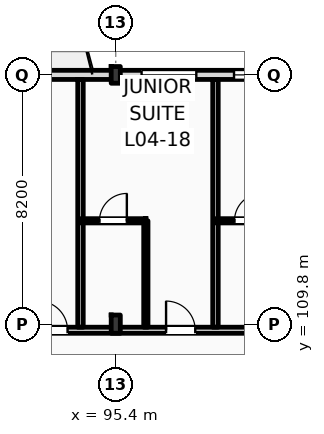
"""IFC4 building model, lengths in metres.
Left out: names, types, materials, properties, quantities, classifications, styles, units other than length and angle.
Written with IfcOpenShell. Run it as: python <this file> out.ifc"""

import sys

from ifc_helpers import new_model, si_unit, direction, frame, frame_2d, origin, origin_2d, place, context, subcontext, project, spatial, rectangle, i_section, extrude, element, fill, save


model = new_model("IFC4")
c1 = context("Model", 3, precision=1e-05, world=origin(), true_north=direction((0.0, 1.0)))
c2 = subcontext(c1, "Body", "Model", "MODEL_VIEW")
j1 = project(units=[si_unit("LENGTHUNIT", "METRE"), si_unit("PLANEANGLEUNIT", "RADIAN")], contexts=[c1])
p1 = place(None, origin())
s1 = spatial("IfcSite", under=j1, at=p1, CompositionType="ELEMENT")
p2 = place(p1, origin())
s2 = spatial("IfcBuilding", under=s1, at=p2, CompositionType="ELEMENT")
p3 = place(p2, frame((0.0, 0.0, 20.4)))
s3 = spatial("IfcBuildingStorey", under=s2, at=p3, CompositionType="ELEMENT", Elevation=20.4)
p4 = place(p3, frame((95.4, 109.8, 0.0), z_axis=(0.0, 0.0, 1.0), x_axis=(1.0, 0.0, 0.0)))
e1 = element("IfcColumn", 1, at=p4, inside=s3, PredefinedType="COLUMN", context=c2, shape_type="SweptSolid", body=[
    extrude(i_section(OverallWidth=0.3, OverallDepth=0.6, WebThickness=0.015, FlangeThickness=0.03, FilletRadius=0.027, at=origin_2d()), origin(), (0.0, 0.0, 1.0), 4.2),
])
p5 = place(p3, frame((95.4, 118.0, 0.0), z_axis=(0.0, 0.0, 1.0), x_axis=(1.0, 0.0, 0.0)))
e2 = element("IfcColumn", 2, at=p5, inside=s3, PredefinedType="COLUMN", context=c2, shape_type="SweptSolid", body=[
    extrude(i_section(OverallWidth=0.3, OverallDepth=0.55, WebThickness=0.015, FlangeThickness=0.029, FilletRadius=0.027, at=origin_2d()), origin(), (0.0, 0.0, 1.0), 4.2),
])
p6 = place(p3, frame((22.5, 118.0, 0.0), z_axis=(0.0, 0.0, 1.0), x_axis=(1.0, 0.0, 0.0)))
e3 = element("IfcWall", 3, at=p6, inside=s3, PredefinedType="STANDARD", context=c2, shape_type="SweptSolid", body=[
    extrude(rectangle(XDim=97.5, YDim=0.3, at=frame_2d((48.75, 0.0))), origin(), (0.0, 0.0, 1.0), 3.38),
])
p7 = place(p6, frame((0.91, 0.0, 0.9)))
e4 = element("IfcOpeningElement", 4, at=p7, cuts=e3, PredefinedType="OPENING", context=c2, shape_type="SweptSolid", body=[
    extrude(rectangle(XDim=0.9, YDim=1.8, at=frame_2d((0.45, 0.9))), frame((0.0, 0.16, 0.0), z_axis=(0.0, -1.0, 0.0), x_axis=(1.0, 0.0, 0.0)), (0.0, 0.0, 1.0), 0.32),
])
p8 = place(p6, frame((6.36, 0.0, 0.0)))
e5 = element("IfcOpeningElement", 5, at=p8, cuts=e3, PredefinedType="OPENING", context=c2, shape_type="SweptSolid", body=[
    extrude(rectangle(XDim=1.2, YDim=2.25, at=frame_2d((0.6, 1.125))), frame((0.0, 0.16, 0.0), z_axis=(0.0, -1.0, 0.0), x_axis=(1.0, 0.0, 0.0)), (0.0, 0.0, 1.0), 0.32),
])
p9 = place(p6, frame((11.41, 0.0, 0.9)))
e6 = element("IfcOpeningElement", 6, at=p9, cuts=e3, PredefinedType="OPENING", context=c2, shape_type="SweptSolid", body=[
    extrude(rectangle(XDim=1.1, YDim=1.9, at=frame_2d((0.55, 0.95))), frame((0.0, 0.16, 0.0), z_axis=(0.0, -1.0, 0.0), x_axis=(1.0, 0.0, 0.0)), (0.0, 0.0, 1.0), 0.32),
])
p10 = place(p6, frame((14.335, 0.0, 0.9)))
e7 = element("IfcOpeningElement", 7, at=p10, cuts=e3, PredefinedType="OPENING", context=c2, shape_type="SweptSolid", body=[
    extrude(rectangle(XDim=1.65, YDim=1.95, at=frame_2d((0.825, 0.975))), frame((0.0, 0.16, 0.0), z_axis=(0.0, -1.0, 0.0), x_axis=(1.0, 0.0, 0.0)), (0.0, 0.0, 1.0), 0.32),
])
p11 = place(p6, frame((19.26, 0.0, 0.9)))
e8 = element("IfcOpeningElement", 8, at=p11, cuts=e3, PredefinedType="OPENING", context=c2, shape_type="SweptSolid", body=[
    extrude(rectangle(XDim=1.35, YDim=2.0, at=frame_2d((0.675, 1.0))), frame((0.0, 0.16, 0.0), z_axis=(0.0, -1.0, 0.0), x_axis=(1.0, 0.0, 0.0)), (0.0, 0.0, 1.0), 0.32),
])
p12 = place(p6, frame((22.8, 0.0, 0.0)))
e9 = element("IfcOpeningElement", 9, at=p12, cuts=e3, PredefinedType="OPENING", context=c2, shape_type="SweptSolid", body=[
    extrude(rectangle(XDim=1.2, YDim=2.25, at=frame_2d((0.6, 1.125))), frame((0.0, 0.16, 0.0), z_axis=(0.0, -1.0, 0.0), x_axis=(1.0, 0.0, 0.0)), (0.0, 0.0, 1.0), 0.32),
])
p13 = place(p6, frame((26.91, 0.0, 0.9)))
e10 = element("IfcOpeningElement", 10, at=p13, cuts=e3, PredefinedType="OPENING", context=c2, shape_type="SweptSolid", body=[
    extrude(rectangle(XDim=2.1, YDim=2.1, at=frame_2d((1.05, 1.05))), frame((0.0, 0.16, 0.0), z_axis=(0.0, -1.0, 0.0), x_axis=(1.0, 0.0, 0.0)), (0.0, 0.0, 1.0), 0.32),
])
p14 = place(p6, frame((30.835, 0.0, 0.9)))
e11 = element("IfcOpeningElement", 11, at=p14, cuts=e3, PredefinedType="OPENING", context=c2, shape_type="SweptSolid", body=[
    extrude(rectangle(XDim=2.25, YDim=2.15, at=frame_2d((1.125, 1.075))), frame((0.0, 0.16, 0.0), z_axis=(0.0, -1.0, 0.0), x_axis=(1.0, 0.0, 0.0)), (0.0, 0.0, 1.0), 0.32),
])
p15 = place(p6, frame((34.96, 0.0, 0.9)))
e12 = element("IfcOpeningElement", 12, at=p15, cuts=e3, PredefinedType="OPENING", context=c2, shape_type="SweptSolid", body=[
    extrude(rectangle(XDim=2.4, YDim=2.2, at=frame_2d((1.2, 1.1))), frame((0.0, 0.16, 0.0), z_axis=(0.0, -1.0, 0.0), x_axis=(1.0, 0.0, 0.0)), (0.0, 0.0, 1.0), 0.32),
])
p16 = place(p6, frame((39.0, 0.0, 0.0)))
e13 = element("IfcOpeningElement", 13, at=p16, cuts=e3, PredefinedType="OPENING", context=c2, shape_type="SweptSolid", body=[
    extrude(rectangle(XDim=1.2, YDim=2.25, at=frame_2d((0.6, 1.125))), frame((0.0, 0.16, 0.0), z_axis=(0.0, -1.0, 0.0), x_axis=(1.0, 0.0, 0.0)), (0.0, 0.0, 1.0), 0.32),
])
p17 = place(p6, frame((43.21, 0.0, 0.9)))
e14 = element("IfcOpeningElement", 14, at=p17, cuts=e3, PredefinedType="OPENING", context=c2, shape_type="SweptSolid", body=[
    extrude(rectangle(XDim=2.7, YDim=2.3, at=frame_2d((1.35, 1.15))), frame((0.0, 0.16, 0.0), z_axis=(0.0, -1.0, 0.0), x_axis=(1.0, 0.0, 0.0)), (0.0, 0.0, 1.0), 0.32),
])
p18 = place(p6, frame((47.335, 0.0, 0.9)))
e15 = element("IfcOpeningElement", 15, at=p18, cuts=e3, PredefinedType="OPENING", context=c2, shape_type="SweptSolid", body=[
    extrude(rectangle(XDim=1.35, YDim=2.3, at=frame_2d((0.675, 1.15))), frame((0.0, 0.16, 0.0), z_axis=(0.0, -1.0, 0.0), x_axis=(1.0, 0.0, 0.0)), (0.0, 0.0, 1.0), 0.32),
])
p19 = place(p6, frame((52.74, 0.0, 0.0)))
e16 = element("IfcOpeningElement", 16, at=p19, cuts=e3, PredefinedType="OPENING", context=c2, shape_type="SweptSolid", body=[
    extrude(rectangle(XDim=1.2, YDim=2.25, at=frame_2d((0.6, 1.125))), frame((0.0, 0.16, 0.0), z_axis=(0.0, -1.0, 0.0), x_axis=(1.0, 0.0, 0.0)), (0.0, 0.0, 1.0), 0.32),
])
p20 = place(p6, frame((55.36, 0.0, 0.9)))
e17 = element("IfcOpeningElement", 17, at=p20, cuts=e3, PredefinedType="OPENING", context=c2, shape_type="SweptSolid", body=[
    extrude(rectangle(XDim=1.1, YDim=2.3, at=frame_2d((0.55, 1.15))), frame((0.0, 0.16, 0.0), z_axis=(0.0, -1.0, 0.0), x_axis=(1.0, 0.0, 0.0)), (0.0, 0.0, 1.0), 0.32),
])
p21 = place(p6, frame((59.99, 0.0, 0.9)))
e18 = element("IfcOpeningElement", 18, at=p21, cuts=e3, PredefinedType="OPENING", context=c2, shape_type="SweptSolid", body=[
    extrude(rectangle(XDim=2.74, YDim=2.3, at=frame_2d((1.37, 1.15))), frame((0.0, 0.16, 0.0), z_axis=(0.0, -1.0, 0.0), x_axis=(1.0, 0.0, 0.0)), (0.0, 0.0, 1.0), 0.32),
])
p22 = place(p6, frame((65.95, 0.0, 0.9)))
e19 = element("IfcOpeningElement", 19, at=p22, cuts=e3, PredefinedType="OPENING", context=c2, shape_type="SweptSolid", body=[
    extrude(rectangle(XDim=1.35, YDim=2.3, at=frame_2d((0.675, 1.15))), frame((0.0, 0.16, 0.0), z_axis=(0.0, -1.0, 0.0), x_axis=(1.0, 0.0, 0.0)), (0.0, 0.0, 1.0), 0.32),
])
p23 = place(p6, frame((69.16, 0.0, 0.0)))
e20 = element("IfcOpeningElement", 20, at=p23, cuts=e3, PredefinedType="OPENING", context=c2, shape_type="SweptSolid", body=[
    extrude(rectangle(XDim=1.2, YDim=2.25, at=frame_2d((0.6, 1.125))), frame((0.0, 0.16, 0.0), z_axis=(0.0, -1.0, 0.0), x_axis=(1.0, 0.0, 0.0)), (0.0, 0.0, 1.0), 0.32),
])
p24 = place(p6, frame((73.75, 0.0, 0.9)))
e21 = element("IfcOpeningElement", 21, at=p24, cuts=e3, PredefinedType="OPENING", context=c2, shape_type="SweptSolid", body=[
    extrude(rectangle(XDim=1.8, YDim=2.3, at=frame_2d((0.9, 1.15))), frame((0.0, 0.16, 0.0), z_axis=(0.0, -1.0, 0.0), x_axis=(1.0, 0.0, 0.0)), (0.0, 0.0, 1.0), 0.32),
])
p25 = place(p6, frame((76.79, 0.0, 0.9)))
e22 = element("IfcOpeningElement", 22, at=p25, cuts=e3, PredefinedType="OPENING", context=c2, shape_type="SweptSolid", body=[
    extrude(rectangle(XDim=2.74, YDim=2.3, at=frame_2d((1.37, 1.15))), frame((0.0, 0.16, 0.0), z_axis=(0.0, -1.0, 0.0), x_axis=(1.0, 0.0, 0.0)), (0.0, 0.0, 1.0), 0.32),
])
p26 = place(p6, frame((81.55, 0.0, 0.9)))
e23 = element("IfcOpeningElement", 23, at=p26, cuts=e3, PredefinedType="OPENING", context=c2, shape_type="SweptSolid", body=[
    extrude(rectangle(XDim=1.8, YDim=2.3, at=frame_2d((0.9, 1.15))), frame((0.0, 0.16, 0.0), z_axis=(0.0, -1.0, 0.0), x_axis=(1.0, 0.0, 0.0)), (0.0, 0.0, 1.0), 0.32),
])
p27 = place(p6, frame((86.01, 0.0, 0.9)))
e24 = element("IfcOpeningElement", 24, at=p27, cuts=e3, PredefinedType="OPENING", context=c2, shape_type="SweptSolid", body=[
    extrude(rectangle(XDim=1.1, YDim=1.5, at=frame_2d((0.55, 0.75))), frame((0.0, 0.16, 0.0), z_axis=(0.0, -1.0, 0.0), x_axis=(1.0, 0.0, 0.0)), (0.0, 0.0, 1.0), 0.32),
])
p28 = place(p6, frame((90.135, 0.0, 0.9)))
e25 = element("IfcOpeningElement", 25, at=p28, cuts=e3, PredefinedType="OPENING", context=c2, shape_type="SweptSolid", body=[
    extrude(rectangle(XDim=1.25, YDim=1.6, at=frame_2d((0.625, 0.8))), frame((0.0, 0.16, 0.0), z_axis=(0.0, -1.0, 0.0), x_axis=(1.0, 0.0, 0.0)), (0.0, 0.0, 1.0), 0.32),
])
p29 = place(p6, frame((94.34, 0.0, 0.9)))
e26 = element("IfcOpeningElement", 26, at=p29, cuts=e3, PredefinedType="OPENING", context=c2, shape_type="SweptSolid", body=[
    extrude(rectangle(XDim=1.4, YDim=1.7, at=frame_2d((0.7, 0.85))), frame((0.0, 0.16, 0.0), z_axis=(0.0, -1.0, 0.0), x_axis=(1.0, 0.0, 0.0)), (0.0, 0.0, 1.0), 0.32),
])
p30 = place(p3, frame((10.65, 109.6, 0.0), z_axis=(0.0, 0.0, 1.0), x_axis=(1.0, 0.0, 0.0)))
e27 = element("IfcWall", 27, at=p30, inside=s3, PredefinedType="PARTITIONING", context=c2, shape_type="SweptSolid", body=[
    extrude(rectangle(XDim=109.21, YDim=0.2, at=frame_2d((54.605, 0.0))), origin(), (0.0, 0.0, 1.0), 3.38),
])
p31 = place(p30, frame((12.535, 0.0, 0.0)))
e28 = element("IfcOpeningElement", 28, at=p31, cuts=e27, PredefinedType="OPENING", context=c2, shape_type="SweptSolid", body=[
    extrude(rectangle(XDim=1.02, YDim=2.2, at=frame_2d((0.51, 1.1))), frame((0.0, 0.11, 0.0), z_axis=(0.0, -1.0, 0.0), x_axis=(1.0, 0.0, 0.0)), (0.0, 0.0, 1.0), 0.22),
])
p32 = place(p30, frame((19.175, 0.0, 0.0)))
e29 = element("IfcOpeningElement", 29, at=p32, cuts=e27, PredefinedType="OPENING", context=c2, shape_type="SweptSolid", body=[
    extrude(rectangle(XDim=1.02, YDim=2.2, at=frame_2d((0.51, 1.1))), frame((0.0, 0.11, 0.0), z_axis=(0.0, -1.0, 0.0), x_axis=(1.0, 0.0, 0.0)), (0.0, 0.0, 1.0), 0.22),
])
p33 = place(p30, frame((23.375, 0.0, 0.0)))
e30 = element("IfcOpeningElement", 30, at=p33, cuts=e27, PredefinedType="OPENING", context=c2, shape_type="SweptSolid", body=[
    extrude(rectangle(XDim=1.02, YDim=2.2, at=frame_2d((0.51, 1.1))), frame((0.0, 0.11, 0.0), z_axis=(0.0, -1.0, 0.0), x_axis=(1.0, 0.0, 0.0)), (0.0, 0.0, 1.0), 0.22),
])
p34 = place(p30, frame((27.575, 0.0, 0.0)))
e31 = element("IfcOpeningElement", 31, at=p34, cuts=e27, PredefinedType="OPENING", context=c2, shape_type="SweptSolid", body=[
    extrude(rectangle(XDim=1.02, YDim=2.2, at=frame_2d((0.51, 1.1))), frame((0.0, 0.11, 0.0), z_axis=(0.0, -1.0, 0.0), x_axis=(1.0, 0.0, 0.0)), (0.0, 0.0, 1.0), 0.22),
])
p35 = place(p30, frame((31.805, 0.0, 0.0)))
e32 = element("IfcOpeningElement", 32, at=p35, cuts=e27, PredefinedType="OPENING", context=c2, shape_type="SweptSolid", body=[
    extrude(rectangle(XDim=0.96, YDim=2.2, at=frame_2d((0.48, 1.1))), frame((0.0, 0.11, 0.0), z_axis=(0.0, -1.0, 0.0), x_axis=(1.0, 0.0, 0.0)), (0.0, 0.0, 1.0), 0.22),
])
p36 = place(p30, frame((33.855, 0.0, 0.0)))
e33 = element("IfcOpeningElement", 33, at=p36, cuts=e27, PredefinedType="OPENING", context=c2, shape_type="SweptSolid", body=[
    extrude(rectangle(XDim=0.96, YDim=2.2, at=frame_2d((0.48, 1.1))), frame((0.0, 0.11, 0.0), z_axis=(0.0, -1.0, 0.0), x_axis=(1.0, 0.0, 0.0)), (0.0, 0.0, 1.0), 0.22),
])
p37 = place(p30, frame((40.205, 0.0, 0.0)))
e34 = element("IfcOpeningElement", 34, at=p37, cuts=e27, PredefinedType="OPENING", context=c2, shape_type="SweptSolid", body=[
    extrude(rectangle(XDim=0.96, YDim=2.2, at=frame_2d((0.48, 1.1))), frame((0.0, 0.11, 0.0), z_axis=(0.0, -1.0, 0.0), x_axis=(1.0, 0.0, 0.0)), (0.0, 0.0, 1.0), 0.22),
])
p38 = place(p30, frame((42.255, 0.0, 0.0)))
e35 = element("IfcOpeningElement", 35, at=p38, cuts=e27, PredefinedType="OPENING", context=c2, shape_type="SweptSolid", body=[
    extrude(rectangle(XDim=0.96, YDim=2.2, at=frame_2d((0.48, 1.1))), frame((0.0, 0.11, 0.0), z_axis=(0.0, -1.0, 0.0), x_axis=(1.0, 0.0, 0.0)), (0.0, 0.0, 1.0), 0.22),
])
p39 = place(p30, frame((48.605, 0.0, 0.0)))
e36 = element("IfcOpeningElement", 36, at=p39, cuts=e27, PredefinedType="OPENING", context=c2, shape_type="SweptSolid", body=[
    extrude(rectangle(XDim=0.96, YDim=2.2, at=frame_2d((0.48, 1.1))), frame((0.0, 0.11, 0.0), z_axis=(0.0, -1.0, 0.0), x_axis=(1.0, 0.0, 0.0)), (0.0, 0.0, 1.0), 0.22),
])
p40 = place(p30, frame((50.655, 0.0, 0.0)))
e37 = element("IfcOpeningElement", 37, at=p40, cuts=e27, PredefinedType="OPENING", context=c2, shape_type="SweptSolid", body=[
    extrude(rectangle(XDim=0.96, YDim=2.2, at=frame_2d((0.48, 1.1))), frame((0.0, 0.11, 0.0), z_axis=(0.0, -1.0, 0.0), x_axis=(1.0, 0.0, 0.0)), (0.0, 0.0, 1.0), 0.22),
])
p41 = place(p30, frame((57.005, 0.0, 0.0)))
e38 = element("IfcOpeningElement", 38, at=p41, cuts=e27, PredefinedType="OPENING", context=c2, shape_type="SweptSolid", body=[
    extrude(rectangle(XDim=0.96, YDim=2.2, at=frame_2d((0.48, 1.1))), frame((0.0, 0.11, 0.0), z_axis=(0.0, -1.0, 0.0), x_axis=(1.0, 0.0, 0.0)), (0.0, 0.0, 1.0), 0.22),
])
p42 = place(p30, frame((59.055, 0.0, 0.0)))
e39 = element("IfcOpeningElement", 39, at=p42, cuts=e27, PredefinedType="OPENING", context=c2, shape_type="SweptSolid", body=[
    extrude(rectangle(XDim=0.96, YDim=2.2, at=frame_2d((0.48, 1.1))), frame((0.0, 0.11, 0.0), z_axis=(0.0, -1.0, 0.0), x_axis=(1.0, 0.0, 0.0)), (0.0, 0.0, 1.0), 0.22),
])
p43 = place(p30, frame((65.405, 0.0, 0.0)))
e40 = element("IfcOpeningElement", 40, at=p43, cuts=e27, PredefinedType="OPENING", context=c2, shape_type="SweptSolid", body=[
    extrude(rectangle(XDim=0.96, YDim=2.2, at=frame_2d((0.48, 1.1))), frame((0.0, 0.11, 0.0), z_axis=(0.0, -1.0, 0.0), x_axis=(1.0, 0.0, 0.0)), (0.0, 0.0, 1.0), 0.22),
])
p44 = place(p30, frame((67.205, 0.0, 0.0)))
e41 = element("IfcOpeningElement", 41, at=p44, cuts=e27, PredefinedType="OPENING", context=c2, shape_type="SweptSolid", body=[
    extrude(rectangle(XDim=0.96, YDim=2.2, at=frame_2d((0.48, 1.1))), frame((0.0, 0.11, 0.0), z_axis=(0.0, -1.0, 0.0), x_axis=(1.0, 0.0, 0.0)), (0.0, 0.0, 1.0), 0.22),
])
p45 = place(p30, frame((73.805, 0.0, 0.0)))
e42 = element("IfcOpeningElement", 42, at=p45, cuts=e27, PredefinedType="OPENING", context=c2, shape_type="SweptSolid", body=[
    extrude(rectangle(XDim=0.96, YDim=2.2, at=frame_2d((0.48, 1.1))), frame((0.0, 0.11, 0.0), z_axis=(0.0, -1.0, 0.0), x_axis=(1.0, 0.0, 0.0)), (0.0, 0.0, 1.0), 0.22),
])
p46 = place(p30, frame((78.255, 0.0, 0.0)))
e43 = element("IfcOpeningElement", 43, at=p46, cuts=e27, PredefinedType="OPENING", context=c2, shape_type="SweptSolid", body=[
    extrude(rectangle(XDim=0.96, YDim=2.2, at=frame_2d((0.48, 1.1))), frame((0.0, 0.11, 0.0), z_axis=(0.0, -1.0, 0.0), x_axis=(1.0, 0.0, 0.0)), (0.0, 0.0, 1.0), 0.22),
])
p47 = place(p30, frame((82.205, 0.0, 0.0)))
e44 = element("IfcOpeningElement", 44, at=p47, cuts=e27, PredefinedType="OPENING", context=c2, shape_type="SweptSolid", body=[
    extrude(rectangle(XDim=0.96, YDim=2.2, at=frame_2d((0.48, 1.1))), frame((0.0, 0.11, 0.0), z_axis=(0.0, -1.0, 0.0), x_axis=(1.0, 0.0, 0.0)), (0.0, 0.0, 1.0), 0.22),
])
p48 = place(p30, frame((86.405, 0.0, 0.0)))
e45 = element("IfcOpeningElement", 45, at=p48, cuts=e27, PredefinedType="OPENING", context=c2, shape_type="SweptSolid", body=[
    extrude(rectangle(XDim=0.96, YDim=2.2, at=frame_2d((0.48, 1.1))), frame((0.0, 0.11, 0.0), z_axis=(0.0, -1.0, 0.0), x_axis=(1.0, 0.0, 0.0)), (0.0, 0.0, 1.0), 0.22),
])
p49 = place(p30, frame((90.605, 0.0, 0.0)))
e46 = element("IfcOpeningElement", 46, at=p49, cuts=e27, PredefinedType="OPENING", context=c2, shape_type="SweptSolid", body=[
    extrude(rectangle(XDim=0.96, YDim=2.2, at=frame_2d((0.48, 1.1))), frame((0.0, 0.11, 0.0), z_axis=(0.0, -1.0, 0.0), x_axis=(1.0, 0.0, 0.0)), (0.0, 0.0, 1.0), 0.22),
])
p50 = place(p30, frame((94.805, 0.0, 0.0)))
e47 = element("IfcOpeningElement", 47, at=p50, cuts=e27, PredefinedType="OPENING", context=c2, shape_type="SweptSolid", body=[
    extrude(rectangle(XDim=0.96, YDim=2.2, at=frame_2d((0.48, 1.1))), frame((0.0, 0.11, 0.0), z_axis=(0.0, -1.0, 0.0), x_axis=(1.0, 0.0, 0.0)), (0.0, 0.0, 1.0), 0.22),
])
p51 = place(p30, frame((99.005, 0.0, 0.0)))
e48 = element("IfcOpeningElement", 48, at=p51, cuts=e27, PredefinedType="OPENING", context=c2, shape_type="SweptSolid", body=[
    extrude(rectangle(XDim=0.96, YDim=2.2, at=frame_2d((0.48, 1.1))), frame((0.0, 0.11, 0.0), z_axis=(0.0, -1.0, 0.0), x_axis=(1.0, 0.0, 0.0)), (0.0, 0.0, 1.0), 0.22),
])
p52 = place(p30, frame((103.205, 0.0, 0.0)))
e49 = element("IfcOpeningElement", 49, at=p52, cuts=e27, PredefinedType="OPENING", context=c2, shape_type="SweptSolid", body=[
    extrude(rectangle(XDim=0.96, YDim=2.2, at=frame_2d((0.48, 1.1))), frame((0.0, 0.11, 0.0), z_axis=(0.0, -1.0, 0.0), x_axis=(1.0, 0.0, 0.0)), (0.0, 0.0, 1.0), 0.22),
])
p53 = place(p30, frame((105.335, 0.0, 0.0)))
e50 = element("IfcOpeningElement", 50, at=p53, cuts=e27, PredefinedType="OPENING", context=c2, shape_type="SweptSolid", body=[
    extrude(rectangle(XDim=0.96, YDim=2.2, at=frame_2d((0.48, 1.1))), frame((0.0, 0.11, 0.0), z_axis=(0.0, -1.0, 0.0), x_axis=(1.0, 0.0, 0.0)), (0.0, 0.0, 1.0), 0.22),
])
p54 = place(p30, frame((2.716, 0.0, 0.0)))
e51 = element("IfcOpeningElement", 51, at=p54, cuts=e27, PredefinedType="OPENING", context=c2, shape_type="SweptSolid", body=[
    extrude(rectangle(XDim=1.35, YDim=2.25, at=frame_2d((0.675, 1.125))), frame((0.0, 0.11, 0.0), z_axis=(0.0, -1.0, 0.0), x_axis=(1.0, 0.0, 0.0)), (0.0, 0.0, 1.0), 0.22),
])
p55 = place(p30, frame((6.65, 0.0, 0.0)))
e52 = element("IfcOpeningElement", 52, at=p55, cuts=e27, PredefinedType="OPENING", context=c2, shape_type="SweptSolid", body=[
    extrude(rectangle(XDim=1.35, YDim=2.25, at=frame_2d((0.675, 1.125))), frame((0.0, 0.11, 0.0), z_axis=(0.0, -1.0, 0.0), x_axis=(1.0, 0.0, 0.0)), (0.0, 0.0, 1.0), 0.22),
])
p56 = place(p30, frame((10.583, 0.0, 0.0)))
e53 = element("IfcOpeningElement", 53, at=p56, cuts=e27, PredefinedType="OPENING", context=c2, shape_type="SweptSolid", body=[
    extrude(rectangle(XDim=1.35, YDim=2.25, at=frame_2d((0.675, 1.125))), frame((0.0, 0.11, 0.0), z_axis=(0.0, -1.0, 0.0), x_axis=(1.0, 0.0, 0.0)), (0.0, 0.0, 1.0), 0.22),
])
for number, where, z_axis, x_axis in (
    (54, (94.24, 109.7, 0.0), (0.0, 0.0, 1.0), (0.0, 1.0, 0.0)),
    (55, (98.68, 109.7, 0.0), (0.0, 0.0, 1.0), (0.0, 1.0, 0.0)),
):
    element("IfcWall", number, at=place(p3, frame(where, z_axis=z_axis, x_axis=x_axis)), inside=s3, PredefinedType="PARTITIONING", context=c2, shape_type="SweptSolid", body=[
        extrude(rectangle(XDim=8.15, YDim=0.18, at=frame_2d((4.075, 0.0))), origin(), (0.0, 0.0, 1.0), 3.94),
    ])
p57 = place(p3, frame((96.39, 109.7, 0.0), z_axis=(0.0, 0.0, 1.0), x_axis=(0.0, 1.0, 0.0)))
e56 = element("IfcWall", 56, at=p57, inside=s3, PredefinedType="PARTITIONING", context=c2, shape_type="SweptSolid", body=[
    extrude(rectangle(XDim=3.5, YDim=0.14, at=frame_2d((1.75, 0.0))), origin(), (0.0, 0.0, 1.0), 3.94),
])
p58 = place(p3, frame((94.24, 113.2, 0.0), z_axis=(0.0, 0.0, 1.0), x_axis=(1.0, 0.0, 0.0)))
e57 = element("IfcWall", 57, at=p58, inside=s3, PredefinedType="PARTITIONING", context=c2, shape_type="SweptSolid", body=[
    extrude(rectangle(XDim=2.15, YDim=0.14, at=frame_2d((1.075, 0.0))), origin(), (0.0, 0.0, 1.0), 3.94),
])
p59 = place(p58, frame((0.625, 0.0, 0.0)))
e58 = element("IfcOpeningElement", 58, at=p59, cuts=e57, PredefinedType="OPENING", context=c2, shape_type="SweptSolid", body=[
    extrude(rectangle(XDim=0.9, YDim=2.1, at=frame_2d((0.45, 1.05))), frame((0.0, 0.08, 0.0), z_axis=(0.0, -1.0, 0.0), x_axis=(1.0, 0.0, 0.0)), (0.0, 0.0, 1.0), 0.16),
])
p60 = place(p3, frame((98.68, 113.2, 0.0), z_axis=(0.0, 0.0, 1.0), x_axis=(1.0, 0.0, 0.0)))
e59 = element("IfcWall", 59, at=p60, inside=s3, PredefinedType="PARTITIONING", context=c2, shape_type="SweptSolid", body=[
    extrude(rectangle(XDim=2.15, YDim=0.14, at=frame_2d((1.075, 0.0))), origin(), (0.0, 0.0, 1.0), 3.94),
])
p61 = place(p60, frame((0.625, 0.0, 0.0)))
e60 = element("IfcOpeningElement", 60, at=p61, cuts=e59, PredefinedType="OPENING", context=c2, shape_type="SweptSolid", body=[
    extrude(rectangle(XDim=0.9, YDim=2.1, at=frame_2d((0.45, 1.05))), frame((0.0, 0.08, 0.0), z_axis=(0.0, -1.0, 0.0), x_axis=(1.0, 0.0, 0.0)), (0.0, 0.0, 1.0), 0.16),
])
p62 = place(p24, origin())
e61 = element("IfcWindow", 61, at=p62, inside=s3, PartitioningType="DOUBLE_PANEL_VERTICAL", PredefinedType="WINDOW", context=c2, shape_type="SweptSolid", body=[
    extrude(rectangle(XDim=1.8, YDim=2.3, at=frame_2d((0.9, 1.15))), frame((0.0, 0.03, 0.0), z_axis=(0.0, -1.0, 0.0), x_axis=(1.0, 0.0, 0.0)), (0.0, 0.0, 1.0), 0.06),
])
fill(e21, e61)
p63 = place(p25, origin())
e62 = element("IfcWindow", 62, at=p63, inside=s3, PartitioningType="DOUBLE_PANEL_VERTICAL", PredefinedType="WINDOW", context=c2, shape_type="SweptSolid", body=[
    extrude(rectangle(XDim=2.74, YDim=2.3, at=frame_2d((1.37, 1.15))), frame((0.0, 0.03, 0.0), z_axis=(0.0, -1.0, 0.0), x_axis=(1.0, 0.0, 0.0)), (0.0, 0.0, 1.0), 0.06),
])
fill(e22, e62)
p64 = place(p47, origin())
e63 = element("IfcDoor", 63, at=p64, inside=s3, OperationType="SINGLE_SWING_LEFT", PredefinedType="DOOR", context=c2, shape_type="SweptSolid", body=[
    extrude(rectangle(XDim=0.96, YDim=2.2, at=frame_2d((0.48, 1.1))), frame((0.0, 0.025, 0.0), z_axis=(0.0, -1.0, 0.0), x_axis=(1.0, 0.0, 0.0)), (0.0, 0.0, 1.0), 0.05),
])
fill(e44, e63)
p65 = place(p48, origin())
e64 = element("IfcDoor", 64, at=p65, inside=s3, OperationType="SINGLE_SWING_LEFT", PredefinedType="DOOR", context=c2, shape_type="SweptSolid", body=[
    extrude(rectangle(XDim=0.96, YDim=2.2, at=frame_2d((0.48, 1.1))), frame((0.0, 0.025, 0.0), z_axis=(0.0, -1.0, 0.0), x_axis=(1.0, 0.0, 0.0)), (0.0, 0.0, 1.0), 0.05),
])
fill(e45, e64)
p66 = place(p59, origin())
e65 = element("IfcDoor", 65, at=p66, inside=s3, OperationType="SINGLE_SWING_RIGHT", PredefinedType="DOOR", context=c2, shape_type="SweptSolid", body=[
    extrude(rectangle(XDim=0.9, YDim=2.1, at=frame_2d((0.45, 1.05))), frame((0.0, 0.025, 0.0), z_axis=(0.0, -1.0, 0.0), x_axis=(1.0, 0.0, 0.0)), (0.0, 0.0, 1.0), 0.05),
])
fill(e58, e65)
p67 = place(p61, origin())
e66 = element("IfcDoor", 66, at=p67, inside=s3, OperationType="SINGLE_SWING_RIGHT", PredefinedType="DOOR", context=c2, shape_type="SweptSolid", body=[
    extrude(rectangle(XDim=0.9, YDim=2.1, at=frame_2d((0.45, 1.05))), frame((0.0, 0.025, 0.0), z_axis=(0.0, -1.0, 0.0), x_axis=(1.0, 0.0, 0.0)), (0.0, 0.0, 1.0), 0.05),
])
fill(e60, e66)
save(model, sys.argv[1])
